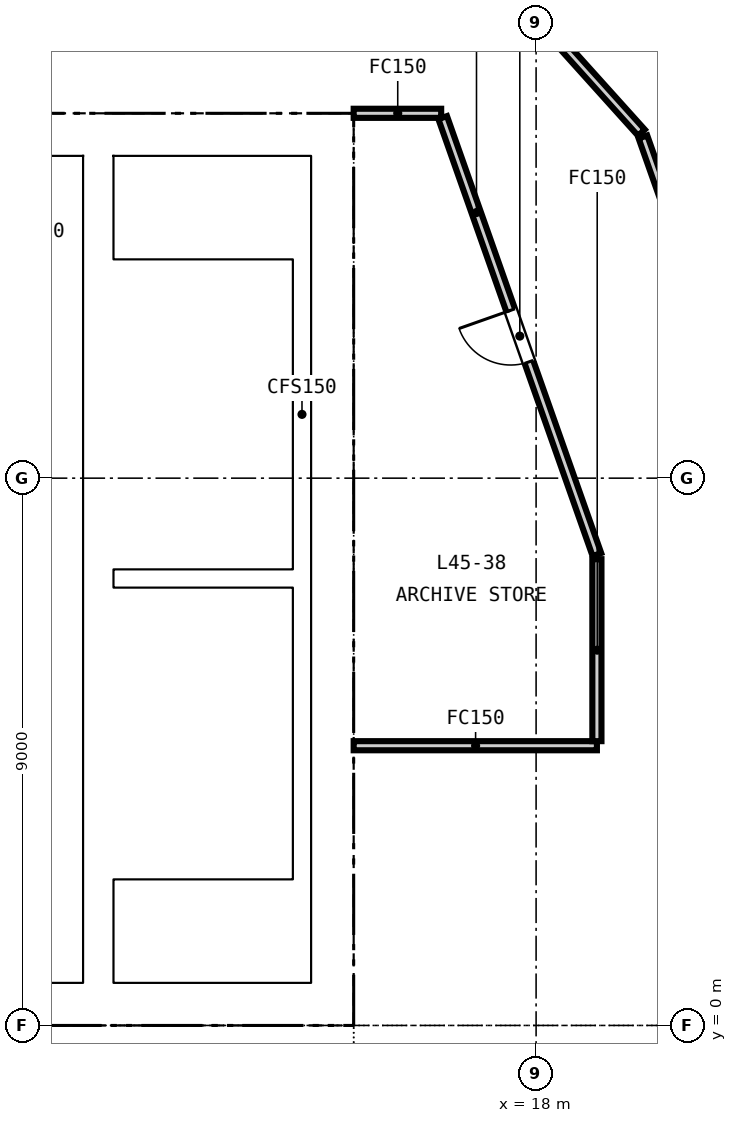
"""IFC4 building model, lengths in metres.
Left out: names, types, materials, properties, quantities, classifications, styles, units other than length and angle.
Written with IfcOpenShell. Run it as: python <this file> out.ifc"""

import sys

from ifc_helpers import new_model, si_unit, direction, frame, frame_2d, origin, place, context, subcontext, project, spatial, rectangle, extrude, element, fill, save


model = new_model("IFC4")
c1 = context("Model", 3, precision=1e-05, world=origin(), true_north=direction((0.0, 1.0)))
c2 = subcontext(c1, "Body", "Model", "MODEL_VIEW")
j1 = project(units=[si_unit("LENGTHUNIT", "METRE"), si_unit("PLANEANGLEUNIT", "RADIAN")], contexts=[c1])
p1 = place(None, origin())
s1 = spatial("IfcSite", under=j1, at=p1, CompositionType="ELEMENT")
p2 = place(p1, origin())
s2 = spatial("IfcBuilding", under=s1, at=p2, CompositionType="ELEMENT")
p3 = place(p2, frame((0.0, 0.0, 181.75)))
s3 = spatial("IfcBuildingStorey", under=s2, at=p3, CompositionType="ELEMENT", Elevation=181.75)
p4 = place(p3, frame((-15.0, 0.35, -0.15), z_axis=(0.0, 0.0, 1.0), x_axis=(1.0, 0.0, 0.0)))
e1 = element("IfcWall", 1, at=p4, inside=s3, PredefinedType="SOLIDWALL", context=c2, shape_type="SweptSolid", body=[
    extrude(rectangle(XDim=30.0, YDim=0.7, at=frame_2d((15.0, 0.0))), origin(), (0.0, 0.0, 1.0), 3.65),
])
p5 = place(p4, frame((5.8, 0.0, 0.15)))
e2 = element("IfcOpeningElement", 2, at=p5, cuts=e1, PredefinedType="OPENING", context=c2, shape_type="SweptSolid", body=[
    extrude(rectangle(XDim=2.4, YDim=2.4, at=frame_2d((1.2, 1.2))), frame((0.0, 0.36, 0.0), z_axis=(0.0, -1.0, 0.0), x_axis=(1.0, 0.0, 0.0)), (0.0, 0.0, 1.0), 0.72),
])
p6 = place(p4, frame((13.8, 0.0, 0.15)))
e3 = element("IfcOpeningElement", 3, at=p6, cuts=e1, PredefinedType="OPENING", context=c2, shape_type="SweptSolid", body=[
    extrude(rectangle(XDim=2.4, YDim=2.4, at=frame_2d((1.2, 1.2))), frame((0.0, 0.36, 0.0), z_axis=(0.0, -1.0, 0.0), x_axis=(1.0, 0.0, 0.0)), (0.0, 0.0, 1.0), 0.72),
])
p7 = place(p4, frame((21.8, 0.0, 0.15)))
e4 = element("IfcOpeningElement", 4, at=p7, cuts=e1, PredefinedType="OPENING", context=c2, shape_type="SweptSolid", body=[
    extrude(rectangle(XDim=2.4, YDim=2.4, at=frame_2d((1.2, 1.2))), frame((0.0, 0.36, 0.0), z_axis=(0.0, -1.0, 0.0), x_axis=(1.0, 0.0, 0.0)), (0.0, 0.0, 1.0), 0.72),
])
p8 = place(p4, frame((1.5, 0.0, 0.15)))
e5 = element("IfcOpeningElement", 5, at=p8, cuts=e1, PredefinedType="OPENING", context=c2, shape_type="SweptSolid", body=[
    extrude(rectangle(XDim=1.2, YDim=2.1, at=frame_2d((0.6, 1.05))), frame((0.0, 0.36, 0.0), z_axis=(0.0, -1.0, 0.0), x_axis=(1.0, 0.0, 0.0)), (0.0, 0.0, 1.0), 0.72),
])
p9 = place(p4, frame((27.3, 0.0, 0.15)))
e6 = element("IfcOpeningElement", 6, at=p9, cuts=e1, PredefinedType="OPENING", context=c2, shape_type="SweptSolid", body=[
    extrude(rectangle(XDim=1.2, YDim=2.1, at=frame_2d((0.6, 1.05))), frame((0.0, 0.36, 0.0), z_axis=(0.0, -1.0, 0.0), x_axis=(1.0, 0.0, 0.0)), (0.0, 0.0, 1.0), 0.72),
])
p10 = place(p3, frame((-15.0, 14.65, -0.15), z_axis=(0.0, 0.0, 1.0), x_axis=(1.0, 0.0, 0.0)))
e7 = element("IfcWall", 7, at=p10, inside=s3, PredefinedType="SOLIDWALL", context=c2, shape_type="SweptSolid", body=[
    extrude(rectangle(XDim=30.0, YDim=0.7, at=frame_2d((15.0, 0.0))), origin(), (0.0, 0.0, 1.0), 3.65),
])
p11 = place(p10, frame((9.25, 0.0, 0.15)))
e8 = element("IfcOpeningElement", 8, at=p11, cuts=e7, PredefinedType="OPENING", context=c2, shape_type="SweptSolid", body=[
    extrude(rectangle(XDim=1.5, YDim=2.1, at=frame_2d((0.75, 1.05))), frame((0.0, 0.36, 0.0), z_axis=(0.0, -1.0, 0.0), x_axis=(1.0, 0.0, 0.0)), (0.0, 0.0, 1.0), 0.72),
])
p12 = place(p10, frame((19.4, 0.0, 0.15)))
e9 = element("IfcOpeningElement", 9, at=p12, cuts=e7, PredefinedType="OPENING", context=c2, shape_type="SweptSolid", body=[
    extrude(rectangle(XDim=1.5, YDim=2.1, at=frame_2d((0.75, 1.05))), frame((0.0, 0.36, 0.0), z_axis=(0.0, -1.0, 0.0), x_axis=(1.0, 0.0, 0.0)), (0.0, 0.0, 1.0), 0.72),
])
p13 = place(p10, frame((1.5, 0.0, 0.15)))
e10 = element("IfcOpeningElement", 10, at=p13, cuts=e7, PredefinedType="OPENING", context=c2, shape_type="SweptSolid", body=[
    extrude(rectangle(XDim=1.2, YDim=2.1, at=frame_2d((0.6, 1.05))), frame((0.0, 0.36, 0.0), z_axis=(0.0, -1.0, 0.0), x_axis=(1.0, 0.0, 0.0)), (0.0, 0.0, 1.0), 0.72),
])
p14 = place(p10, frame((27.3, 0.0, 0.15)))
e11 = element("IfcOpeningElement", 11, at=p14, cuts=e7, PredefinedType="OPENING", context=c2, shape_type="SweptSolid", body=[
    extrude(rectangle(XDim=1.2, YDim=2.1, at=frame_2d((0.6, 1.05))), frame((0.0, 0.36, 0.0), z_axis=(0.0, -1.0, 0.0), x_axis=(1.0, 0.0, 0.0)), (0.0, 0.0, 1.0), 0.72),
])
p15 = place(p3, frame((14.65, 0.7, -0.15), z_axis=(0.0, 0.0, 1.0), x_axis=(0.0, 1.0, 0.0)))
e12 = element("IfcWall", 12, at=p15, inside=s3, PredefinedType="SOLIDWALL", context=c2, shape_type="SweptSolid", body=[
    extrude(rectangle(XDim=13.6, YDim=0.7, at=frame_2d((6.8, 0.0))), origin(), (0.0, 0.0, 1.0), 3.65),
])
p16 = place(p3, frame((10.8, 0.7, -0.15), z_axis=(0.0, 0.0, 1.0), x_axis=(0.0, 1.0, 0.0)))
e13 = element("IfcWall", 13, at=p16, inside=s3, PredefinedType="SOLIDWALL", context=c2, shape_type="SweptSolid", body=[
    extrude(rectangle(XDim=13.6, YDim=0.5, at=frame_2d((6.8, 0.0))), origin(), (0.0, 0.0, 1.0), 3.65),
])
p17 = place(p3, frame((-10.55, 3.5, 0.0), z_axis=(0.0, 0.0, 1.0), x_axis=(1.0, 0.0, 0.0)))
e14 = element("IfcWall", 14, at=p17, inside=s3, PredefinedType="PARTITIONING", context=c2, shape_type="SweptSolid", body=[
    extrude(rectangle(XDim=21.1, YDim=0.2, at=frame_2d((10.55, 0.0))), origin(), (0.0, 0.0, 1.0), 3.5),
])
p18 = place(p17, frame((0.663, 0.0, 0.0)))
e15 = element("IfcOpeningElement", 15, at=p18, cuts=e14, PredefinedType="OPENING", context=c2, shape_type="SweptSolid", body=[
    extrude(rectangle(XDim=1.0, YDim=2.1, at=frame_2d((0.5, 1.05))), frame((0.0, 0.11, 0.0), z_axis=(0.0, -1.0, 0.0), x_axis=(1.0, 0.0, 0.0)), (0.0, 0.0, 1.0), 0.22),
])
p19 = place(p17, frame((4.3, 0.0, 0.0)))
e16 = element("IfcOpeningElement", 16, at=p19, cuts=e14, PredefinedType="OPENING", context=c2, shape_type="SweptSolid", body=[
    extrude(rectangle(XDim=1.0, YDim=2.1, at=frame_2d((0.5, 1.05))), frame((0.0, 0.11, 0.0), z_axis=(0.0, -1.0, 0.0), x_axis=(1.0, 0.0, 0.0)), (0.0, 0.0, 1.0), 0.22),
])
p20 = place(p17, frame((9.1, 0.0, 0.0)))
e17 = element("IfcOpeningElement", 17, at=p20, cuts=e14, PredefinedType="OPENING", context=c2, shape_type="SweptSolid", body=[
    extrude(rectangle(XDim=1.0, YDim=2.1, at=frame_2d((0.5, 1.05))), frame((0.0, 0.11, 0.0), z_axis=(0.0, -1.0, 0.0), x_axis=(1.0, 0.0, 0.0)), (0.0, 0.0, 1.0), 0.22),
])
p21 = place(p17, frame((13.25, 0.0, 0.0)))
e18 = element("IfcOpeningElement", 18, at=p21, cuts=e14, PredefinedType="OPENING", context=c2, shape_type="SweptSolid", body=[
    extrude(rectangle(XDim=1.0, YDim=2.1, at=frame_2d((0.5, 1.05))), frame((0.0, 0.11, 0.0), z_axis=(0.0, -1.0, 0.0), x_axis=(1.0, 0.0, 0.0)), (0.0, 0.0, 1.0), 0.22),
])
p22 = place(p17, frame((16.962, 0.0, 0.0)))
e19 = element("IfcOpeningElement", 19, at=p22, cuts=e14, PredefinedType="OPENING", context=c2, shape_type="SweptSolid", body=[
    extrude(rectangle(XDim=1.0, YDim=2.1, at=frame_2d((0.5, 1.05))), frame((0.0, 0.11, 0.0), z_axis=(0.0, -1.0, 0.0), x_axis=(1.0, 0.0, 0.0)), (0.0, 0.0, 1.0), 0.22),
])
p23 = place(p17, frame((19.9, 0.0, 0.0)))
e20 = element("IfcOpeningElement", 20, at=p23, cuts=e14, PredefinedType="OPENING", context=c2, shape_type="SweptSolid", body=[
    extrude(rectangle(XDim=0.9, YDim=2.1, at=frame_2d((0.45, 1.05))), frame((0.0, 0.11, 0.0), z_axis=(0.0, -1.0, 0.0), x_axis=(1.0, 0.0, 0.0)), (0.0, 0.0, 1.0), 0.22),
])
p24 = place(p3, frame((-10.55, 6.025, 0.0), z_axis=(0.0, 0.0, 1.0), x_axis=(1.0, 0.0, 0.0)))
e21 = element("IfcWall", 21, at=p24, inside=s3, PredefinedType="PARTITIONING", context=c2, shape_type="SweptSolid", body=[
    extrude(rectangle(XDim=21.1, YDim=0.25, at=frame_2d((10.55, 0.0))), origin(), (0.0, 0.0, 1.0), 3.5),
])
p25 = place(p3, frame((-10.55, 8.55, 0.0), z_axis=(0.0, 0.0, 1.0), x_axis=(1.0, 0.0, 0.0)))
e22 = element("IfcWall", 22, at=p25, inside=s3, PredefinedType="PARTITIONING", context=c2, shape_type="SweptSolid", body=[
    extrude(rectangle(XDim=21.1, YDim=0.2, at=frame_2d((10.55, 0.0))), origin(), (0.0, 0.0, 1.0), 3.5),
])
p26 = place(p25, frame((0.675, 0.0, 0.0)))
e23 = element("IfcOpeningElement", 23, at=p26, cuts=e22, PredefinedType="OPENING", context=c2, shape_type="SweptSolid", body=[
    extrude(rectangle(XDim=1.2, YDim=2.1, at=frame_2d((0.6, 1.05))), frame((0.0, 0.11, 0.0), z_axis=(0.0, -1.0, 0.0), x_axis=(1.0, 0.0, 0.0)), (0.0, 0.0, 1.0), 0.22),
])
p27 = place(p25, frame((3.475, 0.0, 0.0)))
e24 = element("IfcOpeningElement", 24, at=p27, cuts=e22, PredefinedType="OPENING", context=c2, shape_type="SweptSolid", body=[
    extrude(rectangle(XDim=1.2, YDim=2.1, at=frame_2d((0.6, 1.05))), frame((0.0, 0.11, 0.0), z_axis=(0.0, -1.0, 0.0), x_axis=(1.0, 0.0, 0.0)), (0.0, 0.0, 1.0), 0.22),
])
p28 = place(p25, frame((6.275, 0.0, 0.0)))
e25 = element("IfcOpeningElement", 25, at=p28, cuts=e22, PredefinedType="OPENING", context=c2, shape_type="SweptSolid", body=[
    extrude(rectangle(XDim=1.2, YDim=2.1, at=frame_2d((0.6, 1.05))), frame((0.0, 0.11, 0.0), z_axis=(0.0, -1.0, 0.0), x_axis=(1.0, 0.0, 0.0)), (0.0, 0.0, 1.0), 0.22),
])
p29 = place(p25, frame((9.075, 0.0, 0.0)))
e26 = element("IfcOpeningElement", 26, at=p29, cuts=e22, PredefinedType="OPENING", context=c2, shape_type="SweptSolid", body=[
    extrude(rectangle(XDim=1.2, YDim=2.1, at=frame_2d((0.6, 1.05))), frame((0.0, 0.11, 0.0), z_axis=(0.0, -1.0, 0.0), x_axis=(1.0, 0.0, 0.0)), (0.0, 0.0, 1.0), 0.22),
])
p30 = place(p25, frame((11.875, 0.0, 0.0)))
e27 = element("IfcOpeningElement", 27, at=p30, cuts=e22, PredefinedType="OPENING", context=c2, shape_type="SweptSolid", body=[
    extrude(rectangle(XDim=1.2, YDim=2.1, at=frame_2d((0.6, 1.05))), frame((0.0, 0.11, 0.0), z_axis=(0.0, -1.0, 0.0), x_axis=(1.0, 0.0, 0.0)), (0.0, 0.0, 1.0), 0.22),
])
p31 = place(p25, frame((14.675, 0.0, 0.0)))
e28 = element("IfcOpeningElement", 28, at=p31, cuts=e22, PredefinedType="OPENING", context=c2, shape_type="SweptSolid", body=[
    extrude(rectangle(XDim=1.2, YDim=2.1, at=frame_2d((0.6, 1.05))), frame((0.0, 0.11, 0.0), z_axis=(0.0, -1.0, 0.0), x_axis=(1.0, 0.0, 0.0)), (0.0, 0.0, 1.0), 0.22),
])
p32 = place(p25, frame((17.475, 0.0, 0.0)))
e29 = element("IfcOpeningElement", 29, at=p32, cuts=e22, PredefinedType="OPENING", context=c2, shape_type="SweptSolid", body=[
    extrude(rectangle(XDim=1.2, YDim=2.1, at=frame_2d((0.6, 1.05))), frame((0.0, 0.11, 0.0), z_axis=(0.0, -1.0, 0.0), x_axis=(1.0, 0.0, 0.0)), (0.0, 0.0, 1.0), 0.22),
])
p33 = place(p25, frame((19.9, 0.0, 0.0)))
e30 = element("IfcOpeningElement", 30, at=p33, cuts=e22, PredefinedType="OPENING", context=c2, shape_type="SweptSolid", body=[
    extrude(rectangle(XDim=0.9, YDim=2.1, at=frame_2d((0.45, 1.05))), frame((0.0, 0.11, 0.0), z_axis=(0.0, -1.0, 0.0), x_axis=(1.0, 0.0, 0.0)), (0.0, 0.0, 1.0), 0.22),
])
p34 = place(p3, frame((5.9, 11.2, 0.0), z_axis=(0.0, 0.0, 1.0), x_axis=(1.0, 0.0, 0.0)))
e31 = element("IfcWall", 31, at=p34, inside=s3, PredefinedType="PARTITIONING", context=c2, shape_type="SweptSolid", body=[
    extrude(rectangle(XDim=4.65, YDim=0.2, at=frame_2d((2.325, 0.0))), origin(), (0.0, 0.0, 1.0), 3.5),
])
p35 = place(p34, frame((3.4, 0.0, 0.0)))
e32 = element("IfcOpeningElement", 32, at=p35, cuts=e31, PredefinedType="OPENING", context=c2, shape_type="SweptSolid", body=[
    extrude(rectangle(XDim=0.9, YDim=2.1, at=frame_2d((0.45, 1.05))), frame((0.0, 0.11, 0.0), z_axis=(0.0, -1.0, 0.0), x_axis=(1.0, 0.0, 0.0)), (0.0, 0.0, 1.0), 0.22),
])
p36 = place(p3, frame((11.05, 7.35, 0.0), z_axis=(0.0, 0.0, 1.0), x_axis=(1.0, 0.0, 0.0)))
e33 = element("IfcWall", 33, at=p36, inside=s3, PredefinedType="SOLIDWALL", context=c2, shape_type="SweptSolid", body=[
    extrude(rectangle(XDim=2.95, YDim=0.3, at=frame_2d((1.475, 0.0))), origin(), (0.0, 0.0, 1.0), 3.5),
])
p37 = place(p3, frame((14.15, 0.7, 0.0), z_axis=(0.0, 0.0, 1.0), x_axis=(0.0, 1.0, 0.0)))
e34 = element("IfcWall", 34, at=p37, inside=s3, PredefinedType="SOLIDWALL", context=c2, shape_type="SweptSolid", body=[
    extrude(rectangle(XDim=13.6, YDim=0.3, at=frame_2d((6.8, 0.0))), origin(), (0.0, 0.0, 1.0), 3.5),
])
p38 = place(p3, frame((16.439, 15.0, 0.0), z_axis=(0.0, 0.0, 1.0), x_axis=(-1.0, 0.0, 0.0)))
e35 = element("IfcWall", 35, at=p38, inside=s3, PredefinedType="PARTITIONING", context=c2, shape_type="SweptSolid", body=[
    extrude(rectangle(XDim=1.439, YDim=0.15, at=frame_2d((0.719, 0.0))), origin(), (0.0, 0.0, 1.0), 2.741),
])
p39 = place(p3, frame((19.0, 7.743, 0.0), z_axis=(0.0, 0.0, 1.0), x_axis=(-0.332768168026, 0.943008667165, 0.0)))
e36 = element("IfcWall", 36, at=p39, inside=s3, PredefinedType="PARTITIONING", context=c2, shape_type="SweptSolid", body=[
    extrude(rectangle(XDim=7.621, YDim=0.15, at=frame_2d((3.81, 0.0))), origin(), (0.0, 0.0, 1.0), 2.741),
])
p40 = place(p39, frame((3.36, 0.0, 0.0)))
e37 = element("IfcOpeningElement", 37, at=p40, cuts=e36, PredefinedType="OPENING", context=c2, shape_type="SweptSolid", body=[
    extrude(rectangle(XDim=0.9, YDim=2.1, at=frame_2d((0.45, 1.05))), frame((0.0, 0.085, 0.0), z_axis=(0.0, -1.0, 0.0), x_axis=(1.0, 0.0, 0.0)), (0.0, 0.0, 1.0), 0.17),
])
p41 = place(p3, frame((16.795, 17.944, 0.0), z_axis=(0.0, 0.0, 1.0), x_axis=(0.66903540409, -0.743230534945, 0.0)))
e38 = element("IfcWall", 38, at=p41, inside=s3, PredefinedType="PARTITIONING", context=c2, shape_type="SweptSolid", body=[
    extrude(rectangle(XDim=4.39, YDim=0.15, at=frame_2d((2.195, 0.0))), origin(), (0.0, 0.0, 1.0), 2.741),
])
p42 = place(p3, frame((19.757, 14.611, 0.0), z_axis=(0.0, 0.0, 1.0), x_axis=(0.332898037941, -0.942962828713, 0.0)))
e39 = element("IfcWall", 39, at=p42, inside=s3, PredefinedType="PARTITIONING", context=c2, shape_type="SweptSolid", body=[
    extrude(rectangle(XDim=5.572, YDim=0.15, at=frame_2d((2.786, 0.0))), origin(), (0.0, 0.0, 1.0), 2.741),
])
p43 = place(p3, frame((15.0, 4.6, 0.0), z_axis=(0.0, 0.0, 1.0), x_axis=(1.0, 0.0, 0.0)))
e40 = element("IfcWall", 40, at=p43, inside=s3, PredefinedType="PARTITIONING", context=c2, shape_type="SweptSolid", body=[
    extrude(rectangle(XDim=4.0, YDim=0.15, at=frame_2d((2.0, 0.0))), origin(), (0.0, 0.0, 1.0), 2.741),
])
p44 = place(p3, frame((19.0, 4.675, 0.0), z_axis=(0.0, 0.0, 1.0), x_axis=(0.0, 1.0, 0.0)))
e41 = element("IfcWall", 41, at=p44, inside=s3, PredefinedType="PARTITIONING", context=c2, shape_type="SweptSolid", body=[
    extrude(rectangle(XDim=2.993, YDim=0.15, at=frame_2d((1.497, 0.0))), origin(), (0.0, 0.0, 1.0), 2.741),
])
p45 = place(p23, origin())
e42 = element("IfcDoor", 42, at=p45, inside=s3, OperationType="SINGLE_SWING_RIGHT", PredefinedType="DOOR", context=c2, shape_type="SweptSolid", body=[
    extrude(rectangle(XDim=0.9, YDim=2.1, at=frame_2d((0.45, 1.05))), frame((0.0, 0.025, 0.0), z_axis=(0.0, -1.0, 0.0), x_axis=(1.0, 0.0, 0.0)), (0.0, 0.0, 1.0), 0.05),
])
fill(e20, e42)
p46 = place(p33, origin())
e43 = element("IfcDoor", 43, at=p46, inside=s3, OperationType="SINGLE_SWING_RIGHT", PredefinedType="DOOR", context=c2, shape_type="SweptSolid", body=[
    extrude(rectangle(XDim=0.9, YDim=2.1, at=frame_2d((0.45, 1.05))), frame((0.0, 0.025, 0.0), z_axis=(0.0, -1.0, 0.0), x_axis=(1.0, 0.0, 0.0)), (0.0, 0.0, 1.0), 0.05),
])
fill(e30, e43)
p47 = place(p35, origin())
e44 = element("IfcDoor", 44, at=p47, inside=s3, OperationType="SINGLE_SWING_LEFT", PredefinedType="DOOR", context=c2, shape_type="SweptSolid", body=[
    extrude(rectangle(XDim=0.9, YDim=2.1, at=frame_2d((0.45, 1.05))), frame((0.0, 0.025, 0.0), z_axis=(0.0, -1.0, 0.0), x_axis=(1.0, 0.0, 0.0)), (0.0, 0.0, 1.0), 0.05),
])
fill(e32, e44)
p48 = place(p14, origin())
e45 = element("IfcDoor", 45, at=p48, inside=s3, OperationType="SINGLE_SWING_LEFT", PredefinedType="DOOR", context=c2, shape_type="SweptSolid", body=[
    extrude(rectangle(XDim=1.2, YDim=2.1, at=frame_2d((0.6, 1.05))), frame((0.0, 0.025, 0.0), z_axis=(0.0, -1.0, 0.0), x_axis=(1.0, 0.0, 0.0)), (0.0, 0.0, 1.0), 0.05),
])
fill(e11, e45)
p49 = place(p9, origin())
e46 = element("IfcDoor", 46, at=p49, inside=s3, OperationType="SINGLE_SWING_RIGHT", PredefinedType="DOOR", context=c2, shape_type="SweptSolid", body=[
    extrude(rectangle(XDim=1.2, YDim=2.1, at=frame_2d((0.6, 1.05))), frame((0.0, 0.025, 0.0), z_axis=(0.0, -1.0, 0.0), x_axis=(1.0, 0.0, 0.0)), (0.0, 0.0, 1.0), 0.05),
])
fill(e6, e46)
p50 = place(p40, origin())
e47 = element("IfcDoor", 47, at=p50, inside=s3, OperationType="SINGLE_SWING_RIGHT", PredefinedType="DOOR", context=c2, shape_type="SweptSolid", body=[
    extrude(rectangle(XDim=0.9, YDim=2.1, at=frame_2d((0.45, 1.05))), frame((0.0, 0.025, 0.0), z_axis=(0.0, -1.0, 0.0), x_axis=(1.0, 0.0, 0.0)), (0.0, 0.0, 1.0), 0.05),
])
fill(e37, e47)
save(model, sys.argv[1])
